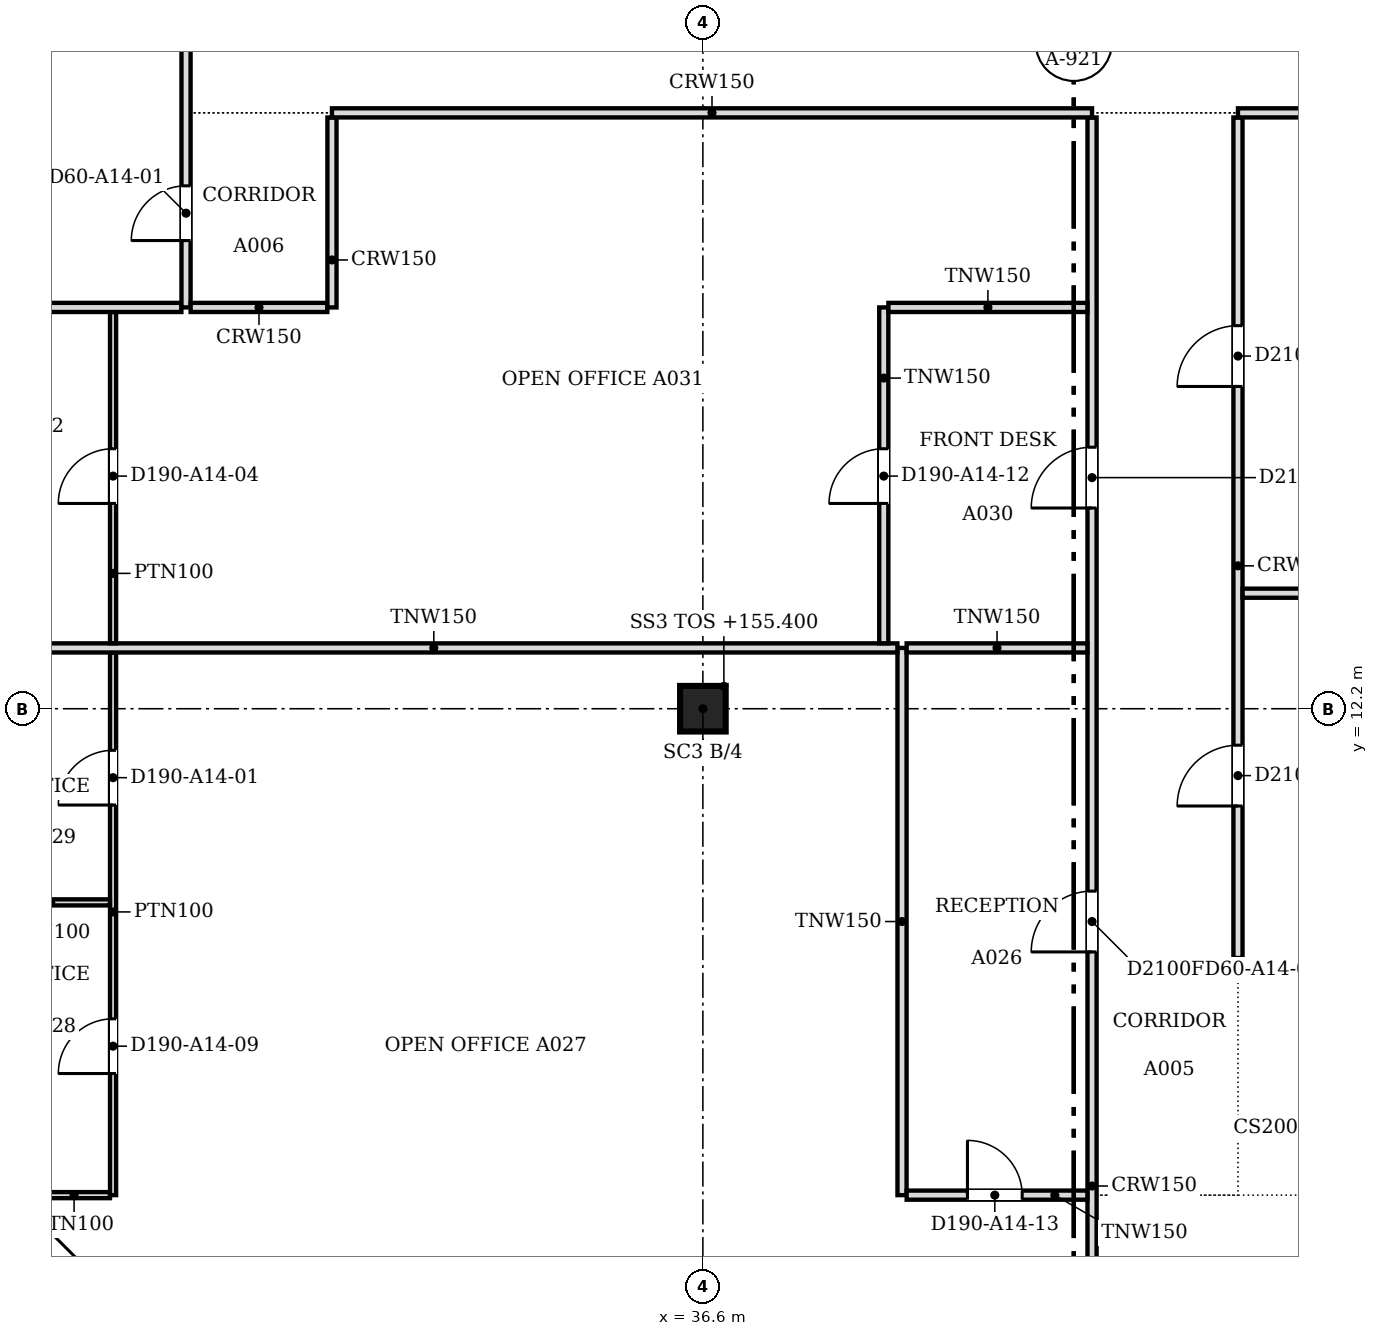
"""IFC4 building model, lengths in metres.
Left out: names, types, materials, properties, quantities, classifications, styles, units other than length and angle.
Written with IfcOpenShell. Run it as: python <this file> out.ifc"""

import sys

from ifc_helpers import new_model, si_unit, direction, frame, frame_2d, origin, origin_2d, place, context, subcontext, project, spatial, polyline, rectangle, outline, extrude, faceted_brep, source, transform, mapped, element, fill, save


model = new_model("IFC4")
c1 = context("Model", 3, precision=1e-05, world=origin(), true_north=direction((0.0, 1.0)))
c2 = subcontext(c1, "Body", "Model", "MODEL_VIEW")
j1 = project(units=[si_unit("LENGTHUNIT", "METRE"), si_unit("PLANEANGLEUNIT", "RADIAN")], contexts=[c1])
p1 = place(None, origin())
s1 = spatial("IfcSite", under=j1, at=p1, CompositionType="ELEMENT")
p2 = place(p1, origin())
s2 = spatial("IfcBuilding", under=s1, at=p2, CompositionType="ELEMENT")
p3 = place(p2, frame((0.0, 0.0, 155.4)))
s3 = spatial("IfcBuildingStorey", under=s2, at=p3, CompositionType="ELEMENT", Elevation=155.4)
p4 = place(p3, frame((36.6, 12.2, 0.0), z_axis=(0.0, 0.0, 1.0), x_axis=(1.0, 0.0, 0.0)))
e1 = element("IfcColumn", 1, at=p4, inside=s3, PredefinedType="COLUMN", context=c2, shape_type="SweptSolid", body=[
    extrude(rectangle(XDim=0.75, YDim=0.75, at=origin_2d()), origin(), (0.0, 0.0, 1.0), 3.6),
])
m1 = source(origin(), c2, "Body", "Brep", [
    faceted_brep([(3.003, -0.25, 3.732), (2.95, -0.25, 3.8), (0.0, -0.25, 0.0), (3.003, -0.25, 0.0), (0.047, 0.25, 0.06), (2.898, 0.25, 3.732), (2.898, 0.25, 0.0), (0.047, 0.25, 0.0), (2.95, 0.0, 3.8), (0.0, 0.0, 0.0)], [[[0, 1, 2, 3]], [[4, 5, 6, 7]], [[8, 1, 0]], [[5, 4, 9, 2, 1, 8]], [[7, 6, 3, 2, 9]], [[7, 9, 4]], [[3, 6, 5, 8, 0]]]),
])
p5 = place(p3, frame((24.65, 6.146, 0.0), z_axis=(0.0, 0.0, 1.0), x_axis=(0.359953949349, -0.932970071518, 0.0)))
e2 = element("IfcWall", 2, at=p5, inside=s3, PredefinedType="SOLIDWALL", context=c2, shape_type="MappedRepresentation", body=[
    mapped(m1, transform((0.0, 0.0, 0.0), scale=1.0)),
])
m2 = source(origin(), c2, "Body", "SweptSolid", [
    extrude(outline(polyline([(2.75, 3.135), (0.511, 0.25), (2.75, 0.25), (2.75, 3.135)])), frame((0.0, 0.26, 0.0), z_axis=(0.0, -1.0, 0.0), x_axis=(1.0, 0.0, 0.0)), (0.0, 0.0, 1.0), 0.52),
])
p6 = place(p5, origin())
e3 = element("IfcOpeningElement", 3, at=p6, cuts=e2, PredefinedType="OPENING", context=c2, shape_type="MappedRepresentation", body=[
    mapped(m2, transform((0.0, 0.0, 0.0), scale=1.0)),
])
m3 = source(origin(), c2, "Body", "Brep", [
    faceted_brep([(2.997, -0.25, 0.0), (0.053, -0.25, 3.8), (0.0, -0.25, 3.732), (0.0, -0.25, 0.0), (0.106, 0.25, 3.732), (2.944, 0.25, 0.068), (2.944, 0.25, 0.0), (0.106, 0.25, 0.0), (0.053, 0.0, 3.8), (2.997, 0.0, 0.0)], [[[0, 1, 2, 3]], [[4, 5, 6, 7]], [[5, 4, 8, 1, 0, 9]], [[2, 1, 8]], [[7, 6, 9, 0, 3]], [[7, 3, 2, 8, 4]], [[9, 6, 5]]]),
])
p7 = place(p3, frame((25.675, 3.431, 0.0), z_axis=(0.0, 0.0, 1.0), x_axis=(0.707106781187, -0.707106781187, 0.0)))
e4 = element("IfcWall", 4, at=p7, inside=s3, PredefinedType="SOLIDWALL", context=c2, shape_type="MappedRepresentation", body=[
    mapped(m3, transform((0.0, 0.0, 0.0), scale=1.0)),
])
m4 = source(origin(), c2, "Body", "SweptSolid", [
    extrude(outline(polyline([(2.487, 0.25), (0.253, 3.134), (0.253, 0.25), (2.487, 0.25)])), frame((0.0, 0.26, 0.0), z_axis=(0.0, -1.0, 0.0), x_axis=(1.0, 0.0, 0.0)), (0.0, 0.0, 1.0), 0.52),
])
p8 = place(p7, origin())
e5 = element("IfcOpeningElement", 5, at=p8, cuts=e4, PredefinedType="OPENING", context=c2, shape_type="MappedRepresentation", body=[
    mapped(m4, transform((0.0, 0.0, 0.0), scale=1.0)),
])
p9 = place(p2, frame((0.0, 0.0, 159.2)))
s4 = spatial("IfcBuildingStorey", under=s2, at=p9, CompositionType="ELEMENT", Elevation=159.2)
m5 = source(origin(), c2, "Body", "Brep", [
    faceted_brep([(0.047, -0.25, 0.0), (2.997, -0.25, 3.8), (0.047, -0.25, 7.6), (0.0, -0.25, 7.541), (0.0, -0.25, 0.059), (0.093, 0.25, 7.54), (2.944, 0.25, 3.868), (2.944, 0.25, 3.732), (0.093, 0.25, 0.06), (2.997, 0.0, 3.8), (0.047, 0.0, 0.0), (0.047, 0.0, 7.6)], [[[0, 1, 2, 3, 4]], [[5, 6, 7, 8]], [[8, 7, 9, 1, 0, 10]], [[6, 5, 11, 2, 1, 9]], [[3, 2, 11]], [[10, 0, 4]], [[8, 10, 4, 3, 11, 5]], [[9, 7, 6]]]),
])
p10 = place(p9, frame((24.633, 6.19, -3.8), z_axis=(0.0, 0.0, 1.0), x_axis=(0.359901446078, -0.932990326376, 0.0)))
e6 = element("IfcWall", 6, at=p10, inside=s4, PredefinedType="SOLIDWALL", context=c2, shape_type="MappedRepresentation", body=[
    mapped(m5, transform((0.0, 0.0, 0.0), scale=1.0)),
])
m6 = source(origin(), c2, "Body", "SweptSolid", [
    extrude(outline(polyline([(0.247, 0.665), (2.681, 3.8), (0.247, 6.935), (0.247, 0.665)])), frame((0.0, 0.26, 0.0), z_axis=(0.0, -1.0, 0.0), x_axis=(1.0, 0.0, 0.0)), (0.0, 0.0, 1.0), 0.52),
])
p11 = place(p10, origin())
e7 = element("IfcOpeningElement", 7, at=p11, cuts=e6, PredefinedType="OPENING", context=c2, shape_type="MappedRepresentation", body=[
    mapped(m6, transform((0.0, 0.0, 0.0), scale=1.0)),
])
m7 = source(origin(), c2, "Body", "Brep", [
    faceted_brep([(2.944, -0.25, 0.0), (2.997, -0.25, 0.068), (2.997, -0.25, 7.532), (2.944, -0.25, 7.6), (0.0, -0.25, 3.8), (0.053, 0.25, 3.868), (2.891, 0.25, 7.532), (2.891, 0.25, 0.068), (0.053, 0.25, 3.732), (2.944, 0.0, 0.0), (2.944, 0.0, 7.6), (0.0, 0.0, 3.8)], [[[0, 1, 2, 3, 4]], [[5, 6, 7, 8]], [[1, 0, 9]], [[10, 3, 2]], [[6, 5, 11, 4, 3, 10]], [[8, 7, 9, 0, 4, 11]], [[8, 11, 5]], [[1, 9, 7, 6, 10, 2]]]),
])
p12 = place(p9, frame((25.712, 3.394, -3.8), z_axis=(0.0, 0.0, 1.0), x_axis=(0.707066050402, -0.707147509625, 0.0)))
e8 = element("IfcWall", 8, at=p12, inside=s4, PredefinedType="SOLIDWALL", context=c2, shape_type="MappedRepresentation", body=[
    mapped(m7, transform((0.0, 0.0, 0.0), scale=1.0)),
])
m8 = source(origin(), c2, "Body", "SweptSolid", [
    extrude(outline(polyline([(2.744, 6.934), (0.316, 3.8), (2.744, 0.667), (2.744, 6.934)])), frame((0.0, 0.26, 0.0), z_axis=(0.0, -1.0, 0.0), x_axis=(1.0, 0.0, 0.0)), (0.0, 0.0, 1.0), 0.52),
])
p13 = place(p12, origin())
e9 = element("IfcOpeningElement", 9, at=p13, cuts=e8, PredefinedType="OPENING", context=c2, shape_type="MappedRepresentation", body=[
    mapped(m8, transform((0.0, 0.0, 0.0), scale=1.0)),
])
p14 = place(p3, frame((43.0, 0.5, 0.0), z_axis=(0.0, 0.0, 1.0), x_axis=(0.0, 1.0, 0.0)))
e10 = element("IfcWall", 10, at=p14, inside=s3, PredefinedType="PARTITIONING", context=c2, shape_type="SweptSolid", body=[
    extrude(rectangle(XDim=21.424, YDim=0.15, at=frame_2d((10.712, 0.0))), origin(), (0.0, 0.0, 1.0), 3.067),
])
m9 = source(origin(), c2, "Body", "SweptSolid", [
    extrude(rectangle(XDim=1.0, YDim=2.1, at=frame_2d((0.5, 1.05))), frame((0.0, 0.085, 0.0), z_axis=(0.0, -1.0, 0.0), x_axis=(1.0, 0.0, 0.0)), (0.0, 0.0, 1.0), 0.17),
])
p15 = place(p14, frame((15.001, 0.0, 0.0)))
e11 = element("IfcOpeningElement", 11, at=p15, cuts=e10, PredefinedType="OPENING", context=c2, shape_type="MappedRepresentation", body=[
    mapped(m9, transform((0.0, 0.0, 0.0), scale=1.0)),
])
p16 = place(p14, frame((7.7, 0.0, 0.0)))
e12 = element("IfcOpeningElement", 12, at=p16, cuts=e10, PredefinedType="OPENING", context=c2, shape_type="MappedRepresentation", body=[
    mapped(m9, transform((0.0, 0.0, 0.0), scale=1.0)),
])
p17 = place(p3, frame((25.669, 4.2, 0.0), z_axis=(0.0, 0.0, 1.0), x_axis=(1.0, 0.0, 0.0)))
e13 = element("IfcWall", 13, at=p17, inside=s3, PredefinedType="PARTITIONING", context=c2, shape_type="SweptSolid", body=[
    extrude(rectangle(XDim=1.18, YDim=0.1, at=frame_2d((0.59, 0.0))), origin(), (0.0, 0.0, 1.0), 3.067),
])
p18 = place(p3, frame((26.9, 4.2, 0.0), z_axis=(0.0, 0.0, 1.0), x_axis=(0.0, 1.0, 0.0)))
e14 = element("IfcWall", 14, at=p18, inside=s3, PredefinedType="PARTITIONING", context=c2, shape_type="SweptSolid", body=[
    extrude(rectangle(XDim=8.924, YDim=0.1, at=frame_2d((4.462, 0.0))), origin(), (0.0, 0.0, 1.0), 3.067),
])
m10 = source(origin(), c2, "Body", "SweptSolid", [
    extrude(rectangle(XDim=0.9, YDim=2.1, at=frame_2d((0.45, 1.05))), frame((0.0, 0.06, 0.0), z_axis=(0.0, -1.0, 0.0), x_axis=(1.0, 0.0, 0.0)), (0.0, 0.0, 1.0), 0.12),
])
p19 = place(p18, frame((6.416, 0.0, 0.0)))
e15 = element("IfcOpeningElement", 15, at=p19, cuts=e14, PredefinedType="OPENING", context=c2, shape_type="MappedRepresentation", body=[
    mapped(m10, transform((0.0, 0.0, 0.0), scale=1.0)),
])
p20 = place(p18, frame((2.0, 0.0, 0.0)))
e16 = element("IfcOpeningElement", 16, at=p20, cuts=e14, PredefinedType="OPENING", context=c2, shape_type="MappedRepresentation", body=[
    mapped(m10, transform((0.0, 0.0, 0.0), scale=1.0)),
])
p21 = place(p3, frame((39.875, 4.2, 0.0), z_axis=(0.0, 0.0, 1.0), x_axis=(0.0, 1.0, 0.0)))
e17 = element("IfcWall", 17, at=p21, inside=s3, PredefinedType="PARTITIONING", context=c2, shape_type="SweptSolid", body=[
    extrude(rectangle(XDim=9.0, YDim=0.15, at=frame_2d((4.5, 0.0))), origin(), (0.0, 0.0, 1.0), 3.067),
])
p22 = place(p3, frame((42.924, 4.2, 0.0), z_axis=(0.0, 0.0, 1.0), x_axis=(-1.0, 0.0, 0.0)))
e18 = element("IfcWall", 18, at=p22, inside=s3, PredefinedType="PARTITIONING", context=c2, shape_type="SweptSolid", body=[
    extrude(rectangle(XDim=2.973, YDim=0.15, at=frame_2d((1.487, 0.0))), origin(), (0.0, 0.0, 1.0), 3.067),
])
m11 = source(origin(), c2, "Body", "SweptSolid", [
    extrude(rectangle(XDim=0.9, YDim=2.1, at=frame_2d((0.45, 1.05))), frame((0.0, 0.085, 0.0), z_axis=(0.0, -1.0, 0.0), x_axis=(1.0, 0.0, 0.0)), (0.0, 0.0, 1.0), 0.17),
])
p23 = place(p22, frame((1.073, 0.0, 0.0)))
e19 = element("IfcOpeningElement", 19, at=p23, cuts=e18, PredefinedType="OPENING", context=c2, shape_type="MappedRepresentation", body=[
    mapped(m11, transform((0.0, 0.0, 0.0), scale=1.0)),
])
p24 = place(p3, frame((45.4, 21.924, 0.0), z_axis=(0.0, 0.0, 1.0), x_axis=(0.0, -1.0, 0.0)))
e20 = element("IfcWall", 20, at=p24, inside=s3, PredefinedType="PARTITIONING", context=c2, shape_type="SweptSolid", body=[
    extrude(rectangle(XDim=13.824, YDim=0.15, at=frame_2d((6.912, 0.0))), origin(), (0.0, 0.0, 1.0), 3.067),
])
p25 = place(p24, frame((10.324, 0.0, 0.0)))
e21 = element("IfcOpeningElement", 21, at=p25, cuts=e20, PredefinedType="OPENING", context=c2, shape_type="MappedRepresentation", body=[
    mapped(m9, transform((0.0, 0.0, 0.0), scale=1.0)),
])
p26 = place(p24, frame((3.424, 0.0, 0.0)))
e22 = element("IfcOpeningElement", 22, at=p26, cuts=e20, PredefinedType="OPENING", context=c2, shape_type="MappedRepresentation", body=[
    mapped(m9, transform((0.0, 0.0, 0.0), scale=1.0)),
])
p27 = place(p3, frame((24.9, 9.015, 0.0), z_axis=(0.0, 0.0, 1.0), x_axis=(1.0, 0.0, 0.0)))
e23 = element("IfcWall", 23, at=p27, inside=s3, PredefinedType="PARTITIONING", context=c2, shape_type="SweptSolid", body=[
    extrude(rectangle(XDim=1.949, YDim=0.1, at=frame_2d((0.975, 0.0))), origin(), (0.0, 0.0, 1.0), 3.067),
])
p28 = place(p3, frame((24.55, 13.2, 0.0), z_axis=(0.0, 0.0, 1.0), x_axis=(1.0, 0.0, 0.0)))
e24 = element("IfcWall", 24, at=p28, inside=s3, PredefinedType="PARTITIONING", context=c2, shape_type="SweptSolid", body=[
    extrude(rectangle(XDim=15.249, YDim=0.15, at=frame_2d((7.625, 0.0))), origin(), (0.0, 0.0, 1.0), 3.067),
])
p29 = place(p3, frame((39.951, 13.2, 0.0), z_axis=(0.0, 0.0, 1.0), x_axis=(1.0, 0.0, 0.0)))
e25 = element("IfcWall", 25, at=p29, inside=s3, PredefinedType="PARTITIONING", context=c2, shape_type="SweptSolid", body=[
    extrude(rectangle(XDim=2.973, YDim=0.15, at=frame_2d((1.487, 0.0))), origin(), (0.0, 0.0, 1.0), 3.067),
])
p30 = place(p3, frame((26.9, 13.276, 0.0), z_axis=(0.0, 0.0, 1.0), x_axis=(0.0, 1.0, 0.0)))
e26 = element("IfcWall", 26, at=p30, inside=s3, PredefinedType="PARTITIONING", context=c2, shape_type="SweptSolid", body=[
    extrude(rectangle(XDim=5.448, YDim=0.1, at=frame_2d((2.724, 0.0))), origin(), (0.0, 0.0, 1.0), 3.067),
])
p31 = place(p30, frame((2.3, 0.0, 0.0)))
e27 = element("IfcOpeningElement", 27, at=p31, cuts=e26, PredefinedType="OPENING", context=c2, shape_type="MappedRepresentation", body=[
    mapped(m10, transform((0.0, 0.0, 0.0), scale=1.0)),
])
p32 = place(p3, frame((39.575, 13.276, 0.0), z_axis=(0.0, 0.0, 1.0), x_axis=(0.0, 1.0, 0.0)))
e28 = element("IfcWall", 28, at=p32, inside=s3, PredefinedType="PARTITIONING", context=c2, shape_type="SweptSolid", body=[
    extrude(rectangle(XDim=5.524, YDim=0.15, at=frame_2d((2.762, 0.0))), origin(), (0.0, 0.0, 1.0), 3.067),
])
p33 = place(p32, frame((2.3, 0.0, 0.0)))
e29 = element("IfcOpeningElement", 29, at=p33, cuts=e28, PredefinedType="OPENING", context=c2, shape_type="MappedRepresentation", body=[
    mapped(m11, transform((0.0, 0.0, 0.0), scale=1.0)),
])
p34 = place(p3, frame((45.476, 14.1, 0.0), z_axis=(0.0, 0.0, 1.0), x_axis=(1.0, 0.0, 0.0)))
e30 = element("IfcWall", 30, at=p34, inside=s3, PredefinedType="PARTITIONING", context=c2, shape_type="SweptSolid", body=[
    extrude(rectangle(XDim=15.024, YDim=0.15, at=frame_2d((7.512, 0.0))), origin(), (0.0, 0.0, 1.0), 3.067),
])
p35 = place(p3, frame((22.0, 18.8, 0.0), z_axis=(0.0, 0.0, 1.0), x_axis=(1.0, 0.0, 0.0)))
e31 = element("IfcWall", 31, at=p35, inside=s3, PredefinedType="PARTITIONING", context=c2, shape_type="SweptSolid", body=[
    extrude(rectangle(XDim=6.024, YDim=0.15, at=frame_2d((3.012, 0.0))), origin(), (0.0, 0.0, 1.0), 3.067),
])
p36 = place(p3, frame((28.1, 18.8, 0.0), z_axis=(0.0, 0.0, 1.0), x_axis=(0.0, 1.0, 0.0)))
e32 = element("IfcWall", 32, at=p36, inside=s3, PredefinedType="PARTITIONING", context=c2, shape_type="SweptSolid", body=[
    extrude(rectangle(XDim=26.5, YDim=0.15, at=frame_2d((13.25, 0.0))), origin(), (0.0, 0.0, 1.0), 3.067),
])
p37 = place(p36, frame((1.1, 0.0, 0.0)))
e33 = element("IfcOpeningElement", 33, at=p37, cuts=e32, PredefinedType="OPENING", context=c2, shape_type="MappedRepresentation", body=[
    mapped(m11, transform((0.0, 0.0, 0.0), scale=1.0)),
])
p38 = place(p36, frame((23.151, 0.0, 0.0)))
e34 = element("IfcOpeningElement", 34, at=p38, cuts=e32, PredefinedType="OPENING", context=c2, shape_type="MappedRepresentation", body=[
    mapped(m9, transform((0.0, 0.0, 0.0), scale=1.0)),
])
p39 = place(p36, frame((8.1, 0.0, 0.0)))
e35 = element("IfcOpeningElement", 35, at=p39, cuts=e32, PredefinedType="OPENING", context=c2, shape_type="MappedRepresentation", body=[
    mapped(m9, transform((0.0, 0.0, 0.0), scale=1.0)),
])
p40 = place(p36, frame((15.8, 0.0, 0.0)))
e36 = element("IfcOpeningElement", 36, at=p40, cuts=e32, PredefinedType="OPENING", context=c2, shape_type="MappedRepresentation", body=[
    mapped(m11, transform((0.0, 0.0, 0.0), scale=1.0)),
])
p41 = place(p3, frame((28.176, 18.8, 0.0), z_axis=(0.0, 0.0, 1.0), x_axis=(1.0, 0.0, 0.0)))
e37 = element("IfcWall", 37, at=p41, inside=s3, PredefinedType="PARTITIONING", context=c2, shape_type="SweptSolid", body=[
    extrude(rectangle(XDim=2.248, YDim=0.15, at=frame_2d((1.124, 0.0))), origin(), (0.0, 0.0, 1.0), 3.067),
])
p42 = place(p3, frame((30.5, 18.8, 0.0), z_axis=(0.0, 0.0, 1.0), x_axis=(0.0, 1.0, 0.0)))
e38 = element("IfcWall", 38, at=p42, inside=s3, PredefinedType="PARTITIONING", context=c2, shape_type="SweptSolid", body=[
    extrude(rectangle(XDim=3.124, YDim=0.15, at=frame_2d((1.562, 0.0))), origin(), (0.0, 0.0, 1.0), 3.067),
])
p43 = place(p3, frame((39.651, 18.8, 0.0), z_axis=(0.0, 0.0, 1.0), x_axis=(1.0, 0.0, 0.0)))
e39 = element("IfcWall", 39, at=p43, inside=s3, PredefinedType="PARTITIONING", context=c2, shape_type="SweptSolid", body=[
    extrude(rectangle(XDim=3.273, YDim=0.15, at=frame_2d((1.637, 0.0))), origin(), (0.0, 0.0, 1.0), 3.067),
])
p44 = place(p3, frame((30.5, 22.0, 0.0), z_axis=(0.0, 0.0, 1.0), x_axis=(1.0, 0.0, 0.0)))
e40 = element("IfcWall", 40, at=p44, inside=s3, PredefinedType="PARTITIONING", context=c2, shape_type="SweptSolid", body=[
    extrude(rectangle(XDim=12.5, YDim=0.15, at=frame_2d((6.25, 0.0))), origin(), (0.0, 0.0, 1.0), 3.067),
])
p45 = place(p3, frame((45.4, 22.0, 0.0), z_axis=(0.0, 0.0, 1.0), x_axis=(1.0, 0.0, 0.0)))
e41 = element("IfcWall", 41, at=p45, inside=s3, PredefinedType="PARTITIONING", context=c2, shape_type="SweptSolid", body=[
    extrude(rectangle(XDim=11.9, YDim=0.15, at=frame_2d((5.95, 0.0))), origin(), (0.0, 0.0, 1.0), 3.067),
])
m12 = source(origin(), c2, "Body", "SweptSolid", [
    extrude(rectangle(XDim=0.9, YDim=2.1, at=frame_2d((0.45, 1.05))), frame((0.0, 0.025, 0.0), z_axis=(0.0, -1.0, 0.0), x_axis=(1.0, 0.0, 0.0)), (0.0, 0.0, 1.0), 0.05),
])
p46 = place(p37, origin())
e42 = element("IfcDoor", 42, at=p46, inside=s3, OperationType="SINGLE_SWING_LEFT", PredefinedType="DOOR", context=c2, shape_type="MappedRepresentation", body=[
    mapped(m12, transform((0.0, 0.0, 0.0), scale=1.0)),
])
fill(e33, e42)
p47 = place(p19, origin())
e43 = element("IfcDoor", 43, at=p47, inside=s3, OperationType="SINGLE_SWING_LEFT", PredefinedType="DOOR", context=c2, shape_type="MappedRepresentation", body=[
    mapped(m12, transform((0.0, 0.0, 0.0), scale=1.0)),
])
fill(e15, e43)
p48 = place(p31, origin())
e44 = element("IfcDoor", 44, at=p48, inside=s3, OperationType="SINGLE_SWING_LEFT", PredefinedType="DOOR", context=c2, shape_type="MappedRepresentation", body=[
    mapped(m12, transform((0.0, 0.0, 0.0), scale=1.0)),
])
fill(e27, e44)
m13 = source(origin(), c2, "Body", "SweptSolid", [
    extrude(rectangle(XDim=1.0, YDim=2.1, at=frame_2d((0.5, 1.05))), frame((0.0, 0.025, 0.0), z_axis=(0.0, -1.0, 0.0), x_axis=(1.0, 0.0, 0.0)), (0.0, 0.0, 1.0), 0.05),
])
p49 = place(p15, origin())
e45 = element("IfcDoor", 45, at=p49, inside=s3, OperationType="SINGLE_SWING_LEFT", PredefinedType="DOOR", context=c2, shape_type="MappedRepresentation", body=[
    mapped(m13, transform((0.0, 0.0, 0.0), scale=1.0)),
])
fill(e11, e45)
p50 = place(p20, origin())
e46 = element("IfcDoor", 46, at=p50, inside=s3, OperationType="SINGLE_SWING_LEFT", PredefinedType="DOOR", context=c2, shape_type="MappedRepresentation", body=[
    mapped(m12, transform((0.0, 0.0, 0.0), scale=1.0)),
])
fill(e16, e46)
p51 = place(p25, origin())
e47 = element("IfcDoor", 47, at=p51, inside=s3, OperationType="SINGLE_SWING_RIGHT", PredefinedType="DOOR", context=c2, shape_type="MappedRepresentation", body=[
    mapped(m13, transform((0.0, 0.0, 0.0), scale=1.0)),
])
fill(e21, e47)
p52 = place(p26, origin())
e48 = element("IfcDoor", 48, at=p52, inside=s3, OperationType="SINGLE_SWING_RIGHT", PredefinedType="DOOR", context=c2, shape_type="MappedRepresentation", body=[
    mapped(m13, transform((0.0, 0.0, 0.0), scale=1.0)),
])
fill(e22, e48)
p53 = place(p33, origin())
e49 = element("IfcDoor", 49, at=p53, inside=s3, OperationType="SINGLE_SWING_LEFT", PredefinedType="DOOR", context=c2, shape_type="MappedRepresentation", body=[
    mapped(m12, transform((0.0, 0.0, 0.0), scale=1.0)),
])
fill(e29, e49)
p54 = place(p16, origin())
e50 = element("IfcDoor", 50, at=p54, inside=s3, OperationType="SINGLE_SWING_LEFT", PredefinedType="DOOR", context=c2, shape_type="MappedRepresentation", body=[
    mapped(m13, transform((0.0, 0.0, 0.0), scale=1.0)),
])
fill(e12, e50)
p55 = place(p23, origin())
e51 = element("IfcDoor", 51, at=p55, inside=s3, OperationType="SINGLE_SWING_RIGHT", PredefinedType="DOOR", context=c2, shape_type="MappedRepresentation", body=[
    mapped(m12, transform((0.0, 0.0, 0.0), scale=1.0)),
])
fill(e19, e51)
save(model, sys.argv[1])
